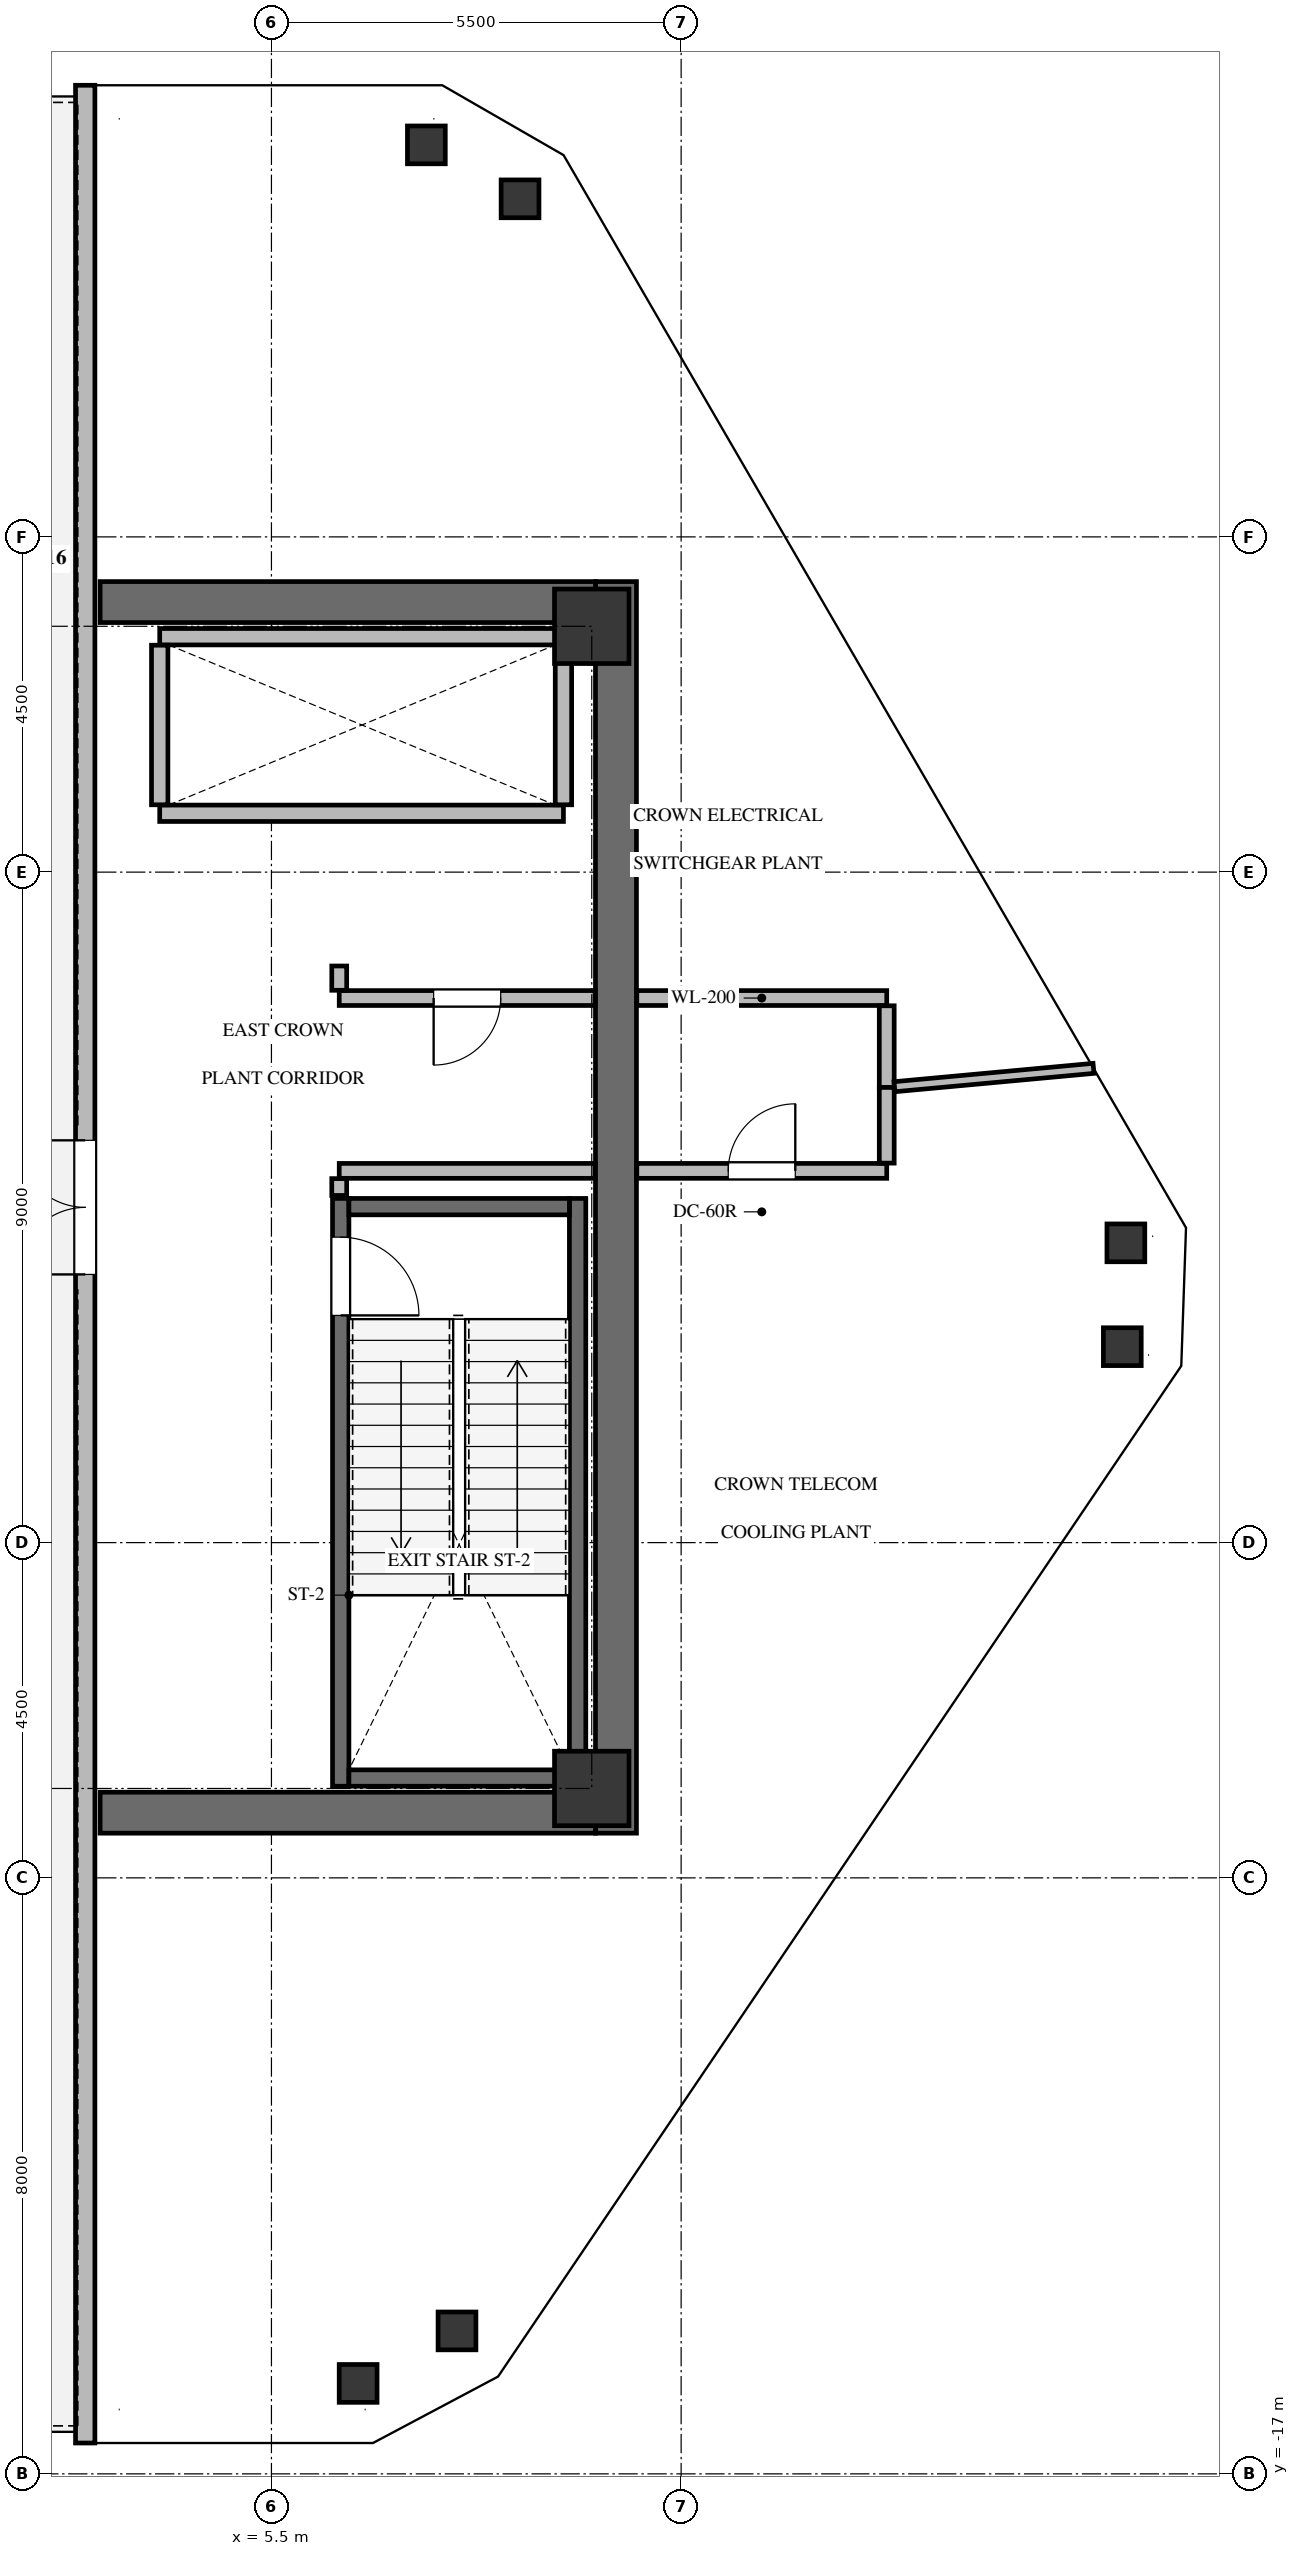
"""IFC4 building model, lengths in metres.
Left out: names, types, materials, properties, quantities, classifications, styles, units other than length and angle.
Written with IfcOpenShell. Run it as: python <this file> out.ifc"""

import sys

from ifc_helpers import new_model, si_unit, direction, frame, frame_2d, origin, origin_2d, place, context, subcontext, project, spatial, rectangle, hollow_circle, extrude, source, transform, mapped, element, fill, save


model = new_model("IFC4")
c1 = context("Model", 3, precision=1e-05, world=origin(), true_north=direction((0.0, 1.0)))
c2 = subcontext(c1, "Body", "Model", "MODEL_VIEW")
j1 = project(units=[si_unit("LENGTHUNIT", "METRE"), si_unit("PLANEANGLEUNIT", "RADIAN")], contexts=[c1])
p1 = place(None, origin())
s1 = spatial("IfcSite", under=j1, at=p1, CompositionType="ELEMENT")
p2 = place(p1, origin())
s2 = spatial("IfcBuilding", under=s1, at=p2, CompositionType="ELEMENT")
p3 = place(p2, frame((0.0, 0.0, 272.5)))
s3 = spatial("IfcBuildingStorey", under=s2, at=p3, CompositionType="ELEMENT", Elevation=272.5)
p4 = place(p3, frame((10.125, -8.4, 0.0), z_axis=(0.0, 0.0, 1.0), x_axis=(0.0, 1.0, 0.0)))
e1 = element("IfcWall", 1, at=p4, inside=s3, PredefinedType="SHEAR", context=c2, shape_type="SweptSolid", body=[
    extrude(rectangle(XDim=16.8, YDim=0.55, at=frame_2d((8.4, 0.0))), origin(), (0.0, 0.0, 1.0), 4.8),
])
for number, where, z_axis, x_axis in (
    (2, (3.2, -8.125, 0.0), (0.0, 0.0, 1.0), (1.0, 0.0, 0.0)),
    (3, (3.2, 8.125, 0.0), (0.0, 0.0, 1.0), (1.0, 0.0, 0.0)),
):
    element("IfcWall", number, at=place(p3, frame(where, z_axis=z_axis, x_axis=x_axis)), inside=s3, PredefinedType="SHEAR", context=c2, shape_type="SweptSolid", body=[
        extrude(rectangle(XDim=6.65, YDim=0.55, at=frame_2d((3.325, 0.0))), origin(), (0.0, 0.0, 1.0), 4.8),
    ])
p5 = place(p3, frame((9.61, -7.77, -0.45), z_axis=(0.0, 0.0, 1.0), x_axis=(0.0, 1.0, 0.0)))
e4 = element("IfcWall", 4, at=p5, inside=s3, PredefinedType="SHEAR", context=c2, shape_type="SweptSolid", body=[
    extrude(rectangle(XDim=7.89, YDim=0.22, at=frame_2d((3.945, 0.0))), origin(), (0.0, 0.0, 1.0), 4.97),
])
p6 = place(p3, frame((6.43, 0.12, -0.45), z_axis=(0.0, 0.0, 1.0), x_axis=(0.0, -1.0, 0.0)))
e5 = element("IfcWall", 5, at=p6, inside=s3, PredefinedType="SHEAR", context=c2, shape_type="SweptSolid", body=[
    extrude(rectangle(XDim=7.89, YDim=0.22, at=frame_2d((3.945, 0.0))), origin(), (0.0, 0.0, 1.0), 4.97),
])
p7 = place(p6, frame((0.52, 0.0, 0.0)))
e6 = element("IfcOpeningElement", 6, at=p7, cuts=e5, PredefinedType="OPENING", context=c2, shape_type="SweptSolid", body=[
    extrude(rectangle(XDim=1.05, YDim=2.15, at=frame_2d((0.525, 1.075))), frame((0.0, 0.12, 0.0), z_axis=(0.0, -1.0, 0.0), x_axis=(1.0, 0.0, 0.0)), (0.0, 0.0, 1.0), 0.24),
])
for number, where, z_axis, x_axis in (
    (7, (6.54, -7.66, -0.45), (0.0, 0.0, 1.0), (1.0, 0.0, 0.0)),
    (8, (9.5, 0.01, -0.45), (0.0, 0.0, 1.0), (-1.0, 0.0, 0.0)),
):
    element("IfcWall", number, at=place(p3, frame(where, z_axis=z_axis, x_axis=x_axis)), inside=s3, PredefinedType="SHEAR", context=c2, shape_type="SweptSolid", body=[
        extrude(rectangle(XDim=2.96, YDim=0.22, at=frame_2d((1.48, 0.0))), origin(), (0.0, 0.0, 1.0), 4.97),
    ])
m1 = source(origin(), c2, "Body", "SweptSolid", [
    extrude(rectangle(XDim=1.0, YDim=1.0, at=origin_2d()), origin(), (0.0, 0.0, 1.0), 4.97),
])
for number, where, z_axis, x_axis in (
    (9, (9.8, -7.8, -0.45), (0.0, 0.0, 1.0), (1.0, 0.0, 0.0)),
    (10, (9.8, 7.8, -0.45), (0.0, 0.0, 1.0), (1.0, 0.0, 0.0)),
):
    element("IfcColumn", number, at=place(p3, frame(where, z_axis=z_axis, x_axis=x_axis)), inside=s3, PredefinedType="COLUMN", context=c2, shape_type="MappedRepresentation", body=[
        mapped(m1, transform((0.0, 0.0, 0.0), x_axis=(1.0, 0.0, 0.0), y_axis=(0.0, 1.0, 0.0), z_axis=(0.0, 0.0, 1.0), scale=1.0)),
    ])
m2 = source(origin(), c2, "Body", "SweptSolid", [
    extrude(hollow_circle(Radius=0.254, WallThickness=0.012, at=origin_2d()), origin(), (0.0, 0.0, 1.0), 4.97),
])
for number, where, z_axis, x_axis in (
    (11, (7.58, 14.262, -0.45), (0.0, 0.0, 1.0), (1.0, 0.0, 0.0)),
    (12, (8.837, 13.538, -0.45), (0.0, 0.0, 1.0), (1.0, 0.0, 0.0)),
    (13, (16.97, -0.476, -0.45), (0.0, 0.0, 1.0), (1.0, 0.0, 0.0)),
    (14, (16.922, -1.87, -0.45), (0.0, 0.0, 1.0), (1.0, 0.0, 0.0)),
    (15, (7.991, -15.081, -0.45), (0.0, 0.0, 1.0), (1.0, 0.0, 0.0)),
    (16, (6.664, -15.786, -0.45), (0.0, 0.0, 1.0), (1.0, 0.0, 0.0)),
):
    element("IfcColumn", number, at=place(p3, frame(where, z_axis=z_axis, x_axis=x_axis)), inside=s3, PredefinedType="COLUMN", context=c2, shape_type="MappedRepresentation", body=[
        mapped(m2, transform((0.0, 0.0, 0.0), x_axis=(1.0, 0.0, 0.0), y_axis=(0.0, 1.0, 0.0), z_axis=(0.0, 0.0, 1.0), scale=1.0)),
    ])
p8 = place(p3, frame((3.0, -16.586, 0.0), z_axis=(0.0, 0.0, 1.0), x_axis=(0.0, 1.0, 0.0)))
e17 = element("IfcWall", 17, at=p8, inside=s3, PredefinedType="SOLIDWALL", context=c2, shape_type="SweptSolid", body=[
    extrude(rectangle(XDim=31.648, YDim=0.26, at=frame_2d((15.824, 0.0))), origin(), (0.0, 0.0, 1.0), 4.52),
])
p9 = place(p8, frame((15.686, 0.0, 0.0)))
e18 = element("IfcOpeningElement", 18, at=p9, cuts=e17, PredefinedType="OPENING", context=c2, shape_type="SweptSolid", body=[
    extrude(rectangle(XDim=1.8, YDim=2.3, at=frame_2d((0.9, 1.15))), frame((0.0, 0.14, 0.0), z_axis=(0.0, -1.0, 0.0), x_axis=(1.0, 0.0, 0.0)), (0.0, 0.0, 1.0), 0.28),
])
for number, where, z_axis, x_axis in (
    (19, (4.0, 5.29, 0.0), (0.0, 0.0, 1.0), (1.0, 0.0, 0.0)),
    (20, (4.0, 7.66, 0.0), (0.0, 0.0, 1.0), (1.0, 0.0, 0.0)),
):
    element("IfcWall", number, at=place(p3, frame(where, z_axis=z_axis, x_axis=x_axis)), inside=s3, PredefinedType="SOLIDWALL", context=c2, shape_type="SweptSolid", body=[
        extrude(rectangle(XDim=5.42, YDim=0.22, at=frame_2d((2.71, 0.0))), origin(), (0.0, 0.0, 1.0), 4.505),
    ])
for number, where, z_axis, x_axis in (
    (21, (4.0, 5.404, 0.0), (0.0, 0.0, 1.0), (0.0, 1.0, 0.0)),
    (22, (9.42, 5.404, 0.0), (0.0, 0.0, 1.0), (0.0, 1.0, 0.0)),
):
    element("IfcWall", number, at=place(p3, frame(where, z_axis=z_axis, x_axis=x_axis)), inside=s3, PredefinedType="SOLIDWALL", context=c2, shape_type="SweptSolid", body=[
        extrude(rectangle(XDim=2.142, YDim=0.22, at=frame_2d((1.071, 0.0))), origin(), (0.0, 0.0, 1.0), 4.505),
    ])
p10 = place(p3, frame((13.76, 2.81, 0.0), z_axis=(0.0, 0.0, 1.0), x_axis=(-1.0, 0.0, 0.0)))
e23 = element("IfcWall", 23, at=p10, inside=s3, PredefinedType="SOLIDWALL", context=c2, shape_type="SweptSolid", body=[
    extrude(rectangle(XDim=3.355, YDim=0.2, at=frame_2d((1.677, 0.0))), origin(), (0.0, 0.0, 1.0), 3.761),
])
p11 = place(p3, frame((9.845, 2.81, 0.0), z_axis=(0.0, 0.0, 1.0), x_axis=(-1.0, 0.0, 0.0)))
e24 = element("IfcWall", 24, at=p11, inside=s3, PredefinedType="SOLIDWALL", context=c2, shape_type="SweptSolid", body=[
    extrude(rectangle(XDim=3.435, YDim=0.2, at=frame_2d((1.718, 0.0))), origin(), (0.0, 0.0, 1.0), 4.505),
])
p12 = place(p11, frame((1.268, 0.0, 0.0)))
e25 = element("IfcOpeningElement", 25, at=p12, cuts=e24, PredefinedType="OPENING", context=c2, shape_type="SweptSolid", body=[
    extrude(rectangle(XDim=0.9, YDim=2.05, at=frame_2d((0.45, 1.025))), frame((0.0, 0.11, 0.0), z_axis=(0.0, -1.0, 0.0), x_axis=(1.0, 0.0, 0.0)), (0.0, 0.0, 1.0), 0.22),
])
p13 = place(p3, frame((13.76, 1.61, 0.0), z_axis=(0.0, 0.0, 1.0), x_axis=(0.0, 1.0, 0.0)))
e26 = element("IfcWall", 26, at=p13, inside=s3, PredefinedType="SOLIDWALL", context=c2, shape_type="SweptSolid", body=[
    extrude(rectangle(XDim=1.096, YDim=0.2, at=frame_2d((0.548, 0.0))), origin(), (0.0, 0.0, 1.0), 3.761),
])
p14 = place(p3, frame((6.41, 2.914, 0.0), z_axis=(0.0, 0.0, 1.0), x_axis=(0.0, 1.0, 0.0)))
e27 = element("IfcWall", 27, at=p14, inside=s3, PredefinedType="SOLIDWALL", context=c2, shape_type="SweptSolid", body=[
    extrude(rectangle(XDim=0.326, YDim=0.2, at=frame_2d((0.163, 0.0))), origin(), (0.0, 0.0, 1.0), 4.505),
])
p15 = place(p3, frame((6.41, 0.49, 0.0), z_axis=(0.0, 0.0, 1.0), x_axis=(1.0, 0.0, 0.0)))
e28 = element("IfcWall", 28, at=p15, inside=s3, PredefinedType="SOLIDWALL", context=c2, shape_type="SweptSolid", body=[
    extrude(rectangle(XDim=3.435, YDim=0.2, at=frame_2d((1.718, 0.0))), origin(), (0.0, 0.0, 1.0), 4.505),
])
p16 = place(p3, frame((10.405, 0.49, 0.0), z_axis=(0.0, 0.0, 1.0), x_axis=(1.0, 0.0, 0.0)))
e29 = element("IfcWall", 29, at=p16, inside=s3, PredefinedType="SOLIDWALL", context=c2, shape_type="SweptSolid", body=[
    extrude(rectangle(XDim=3.355, YDim=0.2, at=frame_2d((1.677, 0.0))), origin(), (0.0, 0.0, 1.0), 3.761),
])
p17 = place(p16, frame((1.228, 0.0, 0.0)))
e30 = element("IfcOpeningElement", 30, at=p17, cuts=e29, PredefinedType="OPENING", context=c2, shape_type="SweptSolid", body=[
    extrude(rectangle(XDim=0.9, YDim=2.05, at=frame_2d((0.45, 1.025))), frame((0.0, 0.11, 0.0), z_axis=(0.0, -1.0, 0.0), x_axis=(1.0, 0.0, 0.0)), (0.0, 0.0, 1.0), 0.22),
])
p18 = place(p3, frame((13.76, 0.594, 0.0), z_axis=(0.0, 0.0, 1.0), x_axis=(0.0, 1.0, 0.0)))
e31 = element("IfcWall", 31, at=p18, inside=s3, PredefinedType="SOLIDWALL", context=c2, shape_type="SweptSolid", body=[
    extrude(rectangle(XDim=1.016, YDim=0.2, at=frame_2d((0.508, 0.0))), origin(), (0.0, 0.0, 1.0), 3.761),
])
p19 = place(p3, frame((6.41, 0.16, 0.0), z_axis=(0.0, 0.0, 1.0), x_axis=(0.0, 1.0, 0.0)))
e32 = element("IfcWall", 32, at=p19, inside=s3, PredefinedType="SOLIDWALL", context=c2, shape_type="SweptSolid", body=[
    extrude(rectangle(XDim=0.226, YDim=0.2, at=frame_2d((0.113, 0.0))), origin(), (0.0, 0.0, 1.0), 4.505),
])
p20 = place(p3, frame((16.536, 1.866, 0.0), z_axis=(0.0, 0.0, 1.0), x_axis=(-0.995776794664, -0.091807272096, 0.0)))
e33 = element("IfcWall", 33, at=p20, inside=s3, PredefinedType="PARTITIONING", context=c2, shape_type="SweptSolid", body=[
    extrude(rectangle(XDim=2.683, YDim=0.135, at=frame_2d((1.342, 0.0))), origin(), (0.0, 0.0, 1.0), 3.761),
])
m3 = source(origin(), c2, "Body", "SweptSolid", [
    extrude(rectangle(XDim=1.8, YDim=2.3, at=frame_2d((0.9, 1.15))), frame((0.0, 0.025, 0.0), z_axis=(0.0, -1.0, 0.0), x_axis=(1.0, 0.0, 0.0)), (0.0, 0.0, 1.0), 0.05),
])
p21 = place(p9, origin())
e34 = element("IfcDoor", 34, at=p21, inside=s3, OperationType="DOUBLE_DOOR_SINGLE_SWING", PredefinedType="DOOR", context=c2, shape_type="MappedRepresentation", body=[
    mapped(m3, transform((0.0, 0.0, 0.0), x_axis=(1.0, 0.0, 0.0), y_axis=(0.0, 1.0, 0.0), z_axis=(0.0, 0.0, 1.0), scale=1.0)),
])
fill(e18, e34)
m4 = source(origin(), c2, "Body", "SweptSolid", [
    extrude(rectangle(XDim=1.05, YDim=2.15, at=frame_2d((0.525, 1.075))), frame((0.0, 0.025, 0.0), z_axis=(0.0, -1.0, 0.0), x_axis=(1.0, 0.0, 0.0)), (0.0, 0.0, 1.0), 0.05),
])
p22 = place(p7, origin())
e35 = element("IfcDoor", 35, at=p22, inside=s3, OperationType="SINGLE_SWING_RIGHT", PredefinedType="DOOR", context=c2, shape_type="MappedRepresentation", body=[
    mapped(m4, transform((0.0, 0.0, 0.0), x_axis=(1.0, 0.0, 0.0), y_axis=(0.0, 1.0, 0.0), z_axis=(0.0, 0.0, 1.0), scale=1.0)),
])
fill(e6, e35)
m5 = source(origin(), c2, "Body", "SweptSolid", [
    extrude(rectangle(XDim=0.9, YDim=2.05, at=frame_2d((0.45, 1.025))), frame((0.0, 0.025, 0.0), z_axis=(0.0, -1.0, 0.0), x_axis=(1.0, 0.0, 0.0)), (0.0, 0.0, 1.0), 0.05),
])
p23 = place(p12, origin())
e36 = element("IfcDoor", 36, at=p23, inside=s3, OperationType="SINGLE_SWING_RIGHT", PredefinedType="DOOR", context=c2, shape_type="MappedRepresentation", body=[
    mapped(m5, transform((0.0, 0.0, 0.0), x_axis=(1.0, 0.0, 0.0), y_axis=(0.0, 1.0, 0.0), z_axis=(0.0, 0.0, 1.0), scale=1.0)),
])
fill(e25, e36)
p24 = place(p17, origin())
e37 = element("IfcDoor", 37, at=p24, inside=s3, OperationType="SINGLE_SWING_RIGHT", PredefinedType="DOOR", context=c2, shape_type="MappedRepresentation", body=[
    mapped(m5, transform((0.0, 0.0, 0.0), x_axis=(1.0, 0.0, 0.0), y_axis=(0.0, 1.0, 0.0), z_axis=(0.0, 0.0, 1.0), scale=1.0)),
])
fill(e30, e37)
save(model, sys.argv[1])
